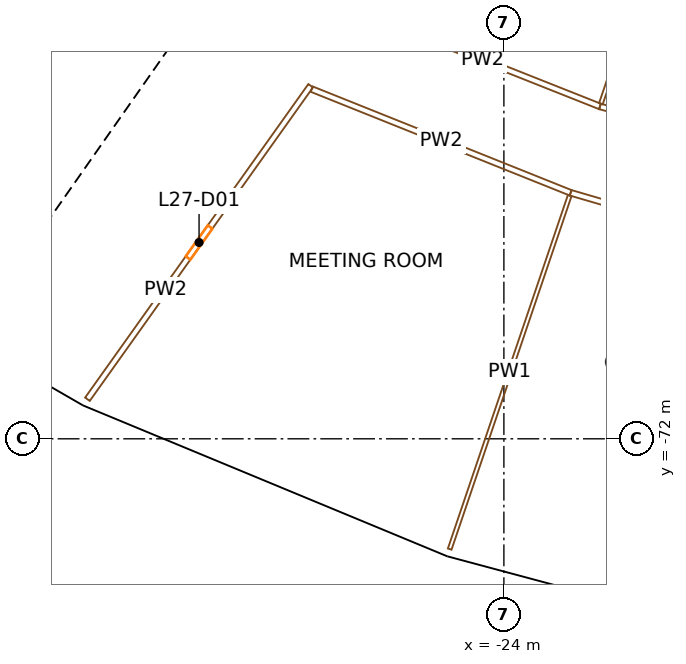
"""IFC4 building model, lengths in metres.
Left out: names, types, materials, properties, quantities, classifications, styles, units other than length and angle.
Written with IfcOpenShell. Run it as: python <this file> out.ifc"""

import sys

from ifc_helpers import new_model, si_unit, direction, frame, frame_2d, origin, origin_2d, place, context, subcontext, project, spatial, rectangle, extrude, element, fill, save


model = new_model("IFC4")
c1 = context("Model", 3, precision=1e-05, world=origin(), true_north=direction((0.0, 1.0)))
c2 = subcontext(c1, "Body", "Model", "MODEL_VIEW")
j1 = project(units=[si_unit("LENGTHUNIT", "METRE"), si_unit("PLANEANGLEUNIT", "RADIAN")], contexts=[c1])
p1 = place(None, origin())
s1 = spatial("IfcSite", under=j1, at=p1, CompositionType="ELEMENT")
p2 = place(p1, origin())
s2 = spatial("IfcBuilding", under=s1, at=p2, CompositionType="ELEMENT")
p3 = place(p2, frame((0.0, 0.0, 121.5)))
s3 = spatial("IfcBuildingStorey", under=s2, at=p3, CompositionType="ELEMENT", Elevation=121.5)
for number, where, z_axis, x_axis in (
    (1, (-34.388, -69.732, 0.0), (0.0, 0.0, 1.0), (0.897, -0.442, 0.0)),
    (2, (-24.992, -73.624, 0.0), (0.0, 0.0, 1.0), (0.947, -0.321, 0.0)),
):
    element("IfcColumn", number, at=place(p3, frame(where, z_axis=z_axis, x_axis=x_axis)), inside=s3, PredefinedType="COLUMN", context=c2, shape_type="SweptSolid", body=[
        extrude(rectangle(XDim=1.2, YDim=1.5, at=origin_2d()), origin(), (0.0, 0.0, 1.0), 3.8),
    ])
p4 = place(p3, frame((-36.717, -66.337, 0.0), z_axis=(0.0, 0.0, 1.0), x_axis=(0.573577477574, 0.819151315216, 0.0)))
e3 = element("IfcWall", 3, at=p4, inside=s3, PredefinedType="SHEAR", context=c2, shape_type="SweptSolid", body=[
    extrude(rectangle(XDim=14.8, YDim=0.9, at=frame_2d((7.4, 0.0))), origin(), (0.0, 0.0, 1.0), 3.5),
])
p5 = place(p4, frame((6.2, 0.0, 0.0)))
e4 = element("IfcOpeningElement", 4, at=p5, cuts=e3, PredefinedType="OPENING", context=c2, shape_type="SweptSolid", body=[
    extrude(rectangle(XDim=2.4, YDim=2.1, at=frame_2d((1.2, 1.05))), frame((0.0, 0.46, 0.0), z_axis=(0.0, -1.0, 0.0), x_axis=(1.0, 0.0, 0.0)), (0.0, 0.0, 1.0), 0.92),
])
p6 = place(p3, frame((-35.221, -63.417, 0.0), z_axis=(0.0, 0.0, 1.0), x_axis=(-0.819166993208, 0.573555086491, 0.0)))
e5 = element("IfcWall", 5, at=p6, inside=s3, PredefinedType="SOLIDWALL", context=c2, shape_type="SweptSolid", body=[
    extrude(rectangle(XDim=7.95, YDim=0.3, at=frame_2d((3.975, 0.0))), origin(), (0.0, 0.0, 1.0), 3.5),
])
p7 = place(p3, frame((-29.084, -62.71, 0.0), z_axis=(0.0, 0.0, 1.0), x_axis=(-0.580031092611, -0.814594335608, 0.0)))
e6 = element("IfcWall", 6, at=p7, inside=s3, PredefinedType="PARTITIONING", context=c2, shape_type="SweptSolid", body=[
    extrude(rectangle(XDim=10.126, YDim=0.15, at=frame_2d((5.063, 0.0))), origin(), (0.0, 0.0, 1.0), 2.4),
])
p8 = place(p7, frame((4.563, 0.0, 0.0)))
e7 = element("IfcOpeningElement", 7, at=p8, cuts=e6, PredefinedType="OPENING", context=c2, shape_type="SweptSolid", body=[
    extrude(rectangle(XDim=1.0, YDim=2.1, at=frame_2d((0.5, 1.05))), frame((0.0, 0.085, 0.0), z_axis=(0.0, -1.0, 0.0), x_axis=(1.0, 0.0, 0.0)), (0.0, 0.0, 1.0), 0.17),
])
p9 = place(p3, frame((-29.058, -62.799, 0.0), z_axis=(0.0, 0.0, 1.0), x_axis=(0.92834358791, -0.371723261025, 0.0)))
e8 = element("IfcWall", 8, at=p9, inside=s3, PredefinedType="PARTITIONING", context=c2, shape_type="SweptSolid", body=[
    extrude(rectangle(XDim=7.34, YDim=0.15, at=frame_2d((3.67, 0.0))), origin(), (0.0, 0.0, 1.0), 2.4),
])
p10 = place(p3, frame((-27.641, -60.809, 0.0), z_axis=(0.0, 0.0, 1.0), x_axis=(0.929586380114, -0.368604343308, 0.0)))
e9 = element("IfcWall", 9, at=p10, inside=s3, PredefinedType="PARTITIONING", context=c2, shape_type="SweptSolid", body=[
    extrude(rectangle(XDim=6.636, YDim=0.15, at=frame_2d((3.318, 0.0))), origin(), (0.0, 0.0, 1.0), 2.4),
])
p11 = place(p3, frame((-25.426, -74.902, 0.0), z_axis=(0.0, 0.0, 1.0), x_axis=(0.3214264651, 0.94693454237, 0.0)))
e10 = element("IfcWall", 10, at=p11, inside=s3, PredefinedType="PARTITIONING", context=c2, shape_type="SweptSolid", body=[
    extrude(rectangle(XDim=9.825, YDim=0.1, at=frame_2d((4.912, 0.0))), origin(), (0.0, 0.0, 1.0), 2.4),
])
p12 = place(p3, frame((-16.446, -67.217, 0.0), z_axis=(0.0, 0.0, 1.0), x_axis=(-0.960056580345, 0.279805937279, 0.0)))
e11 = element("IfcWall", 11, at=p12, inside=s3, PredefinedType="PARTITIONING", context=c2, shape_type="SweptSolid", body=[
    extrude(rectangle(XDim=6.039, YDim=0.15, at=frame_2d((3.02, 0.0))), origin(), (0.0, 0.0, 1.0), 2.4),
])
p13 = place(p12, frame((2.52, 0.0, 0.0)))
e12 = element("IfcOpeningElement", 12, at=p13, cuts=e11, PredefinedType="OPENING", context=c2, shape_type="SweptSolid", body=[
    extrude(rectangle(XDim=1.0, YDim=2.1, at=frame_2d((0.5, 1.05))), frame((0.0, 0.085, 0.0), z_axis=(0.0, -1.0, 0.0), x_axis=(1.0, 0.0, 0.0)), (0.0, 0.0, 1.0), 0.17),
])
p14 = place(p3, frame((-21.472, -63.255, 0.0), z_axis=(0.0, 0.0, 1.0), x_axis=(0.965927722938, -0.258811966607, 0.0)))
e13 = element("IfcWall", 13, at=p14, inside=s3, PredefinedType="PARTITIONING", context=c2, shape_type="SweptSolid", body=[
    extrude(rectangle(XDim=8.738, YDim=0.15, at=frame_2d((4.369, 0.0))), origin(), (0.0, 0.0, 1.0), 2.4),
])
p15 = place(p14, frame((3.869, 0.0, 0.0)))
e14 = element("IfcOpeningElement", 14, at=p15, cuts=e13, PredefinedType="OPENING", context=c2, shape_type="SweptSolid", body=[
    extrude(rectangle(XDim=1.0, YDim=2.1, at=frame_2d((0.5, 1.05))), frame((0.0, 0.085, 0.0), z_axis=(0.0, -1.0, 0.0), x_axis=(1.0, 0.0, 0.0)), (0.0, 0.0, 1.0), 0.17),
])
p16 = place(p3, frame((-18.354, -54.07, 0.0), z_axis=(0.0, 0.0, 1.0), x_axis=(-0.321435668314, -0.946931418391, 0.0)))
e15 = element("IfcWall", 15, at=p16, inside=s3, PredefinedType="PARTITIONING", context=c2, shape_type="SweptSolid", body=[
    extrude(rectangle(XDim=9.625, YDim=0.1, at=frame_2d((4.812, 0.0))), origin(), (0.0, 0.0, 1.0), 2.4),
])
p17 = place(p8, origin())
e16 = element("IfcDoor", 16, at=p17, inside=s3, OperationType="SINGLE_SWING_RIGHT", PredefinedType="DOOR", context=c2, shape_type="SweptSolid", body=[
    extrude(rectangle(XDim=1.0, YDim=2.1, at=frame_2d((0.5, 1.05))), frame((0.0, 0.025, 0.0), z_axis=(0.0, -1.0, 0.0), x_axis=(1.0, 0.0, 0.0)), (0.0, 0.0, 1.0), 0.05),
])
fill(e7, e16)
save(model, sys.argv[1])
